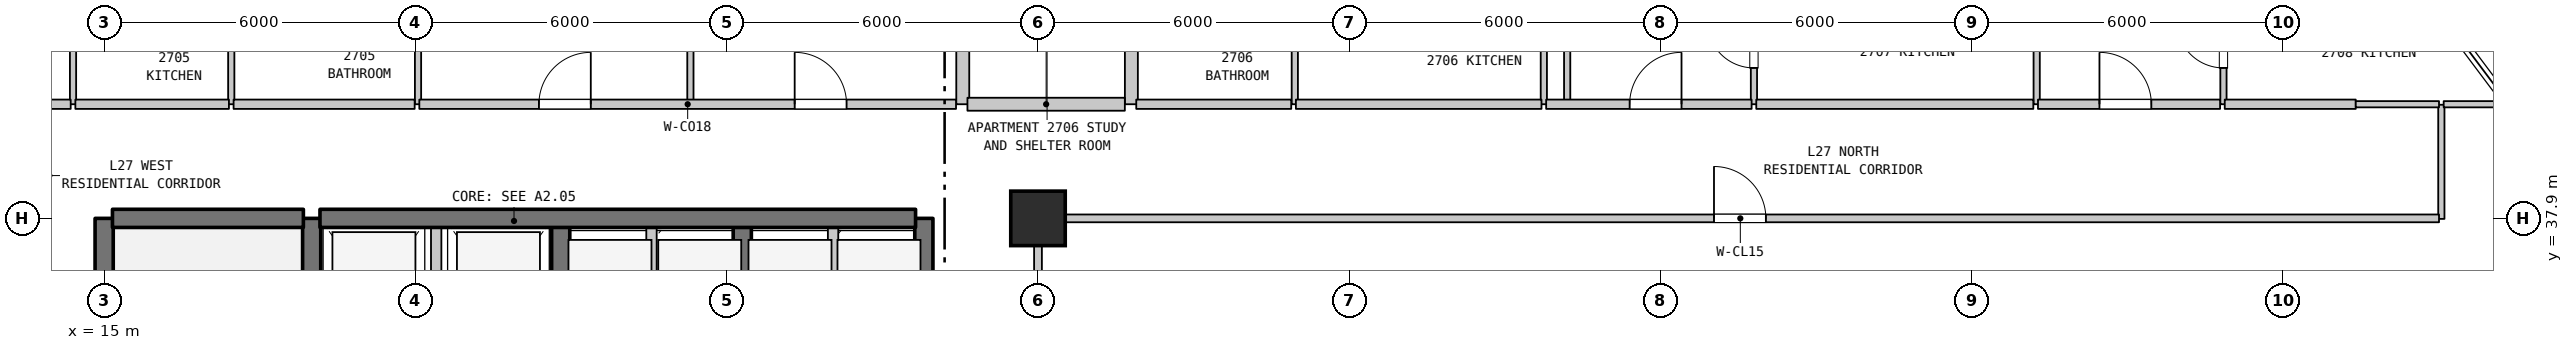
"""IFC4 building model, lengths in metres.
Left out: names, types, materials, properties, quantities, classifications, styles, units other than length and angle.
Written with IfcOpenShell. Run it as: python <this file> out.ifc"""

import sys

from ifc_helpers import new_model, si_unit, direction, frame, frame_2d, origin, origin_2d, place, context, subcontext, project, spatial, rectangle, extrude, element, fill, save


model = new_model("IFC4")
c1 = context("Model", 3, precision=1e-05, world=origin(), true_north=direction((0.0, 1.0)))
c2 = subcontext(c1, "Body", "Model", "MODEL_VIEW")
j1 = project(units=[si_unit("LENGTHUNIT", "METRE"), si_unit("PLANEANGLEUNIT", "RADIAN")], contexts=[c1])
p1 = place(None, origin())
s1 = spatial("IfcSite", under=j1, at=p1, CompositionType="ELEMENT")
p2 = place(p1, origin())
s2 = spatial("IfcBuilding", under=s1, at=p2, CompositionType="ELEMENT")
p3 = place(p2, frame((0.0, 0.0, 113.1)))
s3 = spatial("IfcBuildingStorey", under=s2, at=p3, CompositionType="ELEMENT", Elevation=113.1)
p4 = place(p3, frame((33.0, 37.9, 0.0), z_axis=(0.0, 0.0, 1.0), x_axis=(1.0, 0.0, 0.0)))
e1 = element("IfcColumn", 1, at=p4, inside=s3, PredefinedType="COLUMN", context=c2, shape_type="SweptSolid", body=[
    extrude(rectangle(XDim=1.05, YDim=1.05, at=origin_2d()), origin(), (0.0, 0.0, 1.0), 3.7),
])
p5 = place(p3, frame((14.4, 40.1, 0.0), z_axis=(0.0, 0.0, 1.0), x_axis=(0.0, 1.0, 0.0)))
e2 = element("IfcWall", 2, at=p5, inside=s3, PredefinedType="PARTITIONING", context=c2, shape_type="SweptSolid", body=[
    extrude(rectangle(XDim=2.3, YDim=0.12, at=frame_2d((1.15, 0.0))), origin(), (0.0, 0.0, 1.0), 3.385),
])
p6 = place(p3, frame((15.0, 31.1, 0.0), z_axis=(0.0, 0.0, 1.0), x_axis=(0.0, 1.0, 0.0)))
e3 = element("IfcWall", 3, at=p6, inside=s3, PredefinedType="SHEAR", context=c2, shape_type="SweptSolid", body=[
    extrude(rectangle(XDim=6.8, YDim=0.35, at=frame_2d((3.4, 0.0))), origin(), (0.0, 0.0, 1.0), 3.385),
])
p7 = place(p3, frame((17.45, 40.1, 0.0), z_axis=(0.0, 0.0, 1.0), x_axis=(0.0, 1.0, 0.0)))
e4 = element("IfcWall", 4, at=p7, inside=s3, PredefinedType="PARTITIONING", context=c2, shape_type="SweptSolid", body=[
    extrude(rectangle(XDim=2.3, YDim=0.12, at=frame_2d((1.15, 0.0))), origin(), (0.0, 0.0, 1.0), 3.385),
])
p8 = place(p3, frame((19.0, 35.0, 0.0), z_axis=(0.0, 0.0, 1.0), x_axis=(0.0, 1.0, 0.0)))
e5 = element("IfcWall", 5, at=p8, inside=s3, PredefinedType="SHEAR", context=c2, shape_type="SweptSolid", body=[
    extrude(rectangle(XDim=2.9, YDim=0.35, at=frame_2d((1.45, 0.0))), origin(), (0.0, 0.0, 1.0), 3.385),
])
p9 = place(p3, frame((21.05, 40.1, 0.0), z_axis=(0.0, 0.0, 1.0), x_axis=(0.0, 1.0, 0.0)))
e6 = element("IfcWall", 6, at=p9, inside=s3, PredefinedType="PARTITIONING", context=c2, shape_type="SweptSolid", body=[
    extrude(rectangle(XDim=2.3, YDim=0.12, at=frame_2d((1.15, 0.0))), origin(), (0.0, 0.0, 1.0), 3.085),
])
p10 = place(p3, frame((21.4, 35.0, 0.0), z_axis=(0.0, 0.0, 1.0), x_axis=(0.0, 1.0, 0.0)))
e7 = element("IfcWall", 7, at=p10, inside=s3, PredefinedType="STANDARD", context=c2, shape_type="SweptSolid", body=[
    extrude(rectangle(XDim=2.9, YDim=0.2, at=frame_2d((1.45, 0.0))), origin(), (0.0, 0.0, 1.0), 3.385),
])
p11 = place(p3, frame((23.8, 35.0, 0.0), z_axis=(0.0, 0.0, 1.0), x_axis=(0.0, 1.0, 0.0)))
e8 = element("IfcWall", 8, at=p11, inside=s3, PredefinedType="SHEAR", context=c2, shape_type="SweptSolid", body=[
    extrude(rectangle(XDim=2.9, YDim=0.35, at=frame_2d((1.45, 0.0))), origin(), (0.0, 0.0, 1.0), 3.385),
])
p12 = place(p3, frame((25.55, 35.0, 0.0), z_axis=(0.0, 0.0, 1.0), x_axis=(0.0, 1.0, 0.0)))
e9 = element("IfcWall", 9, at=p12, inside=s3, PredefinedType="STANDARD", context=c2, shape_type="SweptSolid", body=[
    extrude(rectangle(XDim=2.9, YDim=0.2, at=frame_2d((1.45, 0.0))), origin(), (0.0, 0.0, 1.0), 3.385),
])
p13 = place(p3, frame((26.3, 40.1, 0.0), z_axis=(0.0, 0.0, 1.0), x_axis=(0.0, 1.0, 0.0)))
e10 = element("IfcWall", 10, at=p13, inside=s3, PredefinedType="PARTITIONING", context=c2, shape_type="SweptSolid", body=[
    extrude(rectangle(XDim=2.05, YDim=0.12, at=frame_2d((1.025, 0.0))), origin(), (0.0, 0.0, 1.0), 3.385),
])
p14 = place(p3, frame((27.3, 35.0, 0.0), z_axis=(0.0, 0.0, 1.0), x_axis=(0.0, 1.0, 0.0)))
e11 = element("IfcWall", 11, at=p14, inside=s3, PredefinedType="SHEAR", context=c2, shape_type="SweptSolid", body=[
    extrude(rectangle(XDim=2.9, YDim=0.35, at=frame_2d((1.45, 0.0))), origin(), (0.0, 0.0, 1.0), 3.385),
])
p15 = place(p3, frame((29.05, 35.0, 0.0), z_axis=(0.0, 0.0, 1.0), x_axis=(0.0, 1.0, 0.0)))
e12 = element("IfcWall", 12, at=p15, inside=s3, PredefinedType="STANDARD", context=c2, shape_type="SweptSolid", body=[
    extrude(rectangle(XDim=2.9, YDim=0.2, at=frame_2d((1.45, 0.0))), origin(), (0.0, 0.0, 1.0), 3.385),
])
p16 = place(p3, frame((30.8, 35.0, 0.0), z_axis=(0.0, 0.0, 1.0), x_axis=(0.0, 1.0, 0.0)))
e13 = element("IfcWall", 13, at=p16, inside=s3, PredefinedType="SHEAR", context=c2, shape_type="SweptSolid", body=[
    extrude(rectangle(XDim=2.9, YDim=0.35, at=frame_2d((1.45, 0.0))), origin(), (0.0, 0.0, 1.0), 3.385),
])
p17 = place(p3, frame((31.55, 40.1, 0.0), z_axis=(0.0, 0.0, 1.0), x_axis=(0.0, 1.0, 0.0)))
e14 = element("IfcWall", 14, at=p17, inside=s3, PredefinedType="STANDARD", context=c2, shape_type="SweptSolid", body=[
    extrude(rectangle(XDim=2.3, YDim=0.25, at=frame_2d((1.15, 0.0))), origin(), (0.0, 0.0, 1.0), 3.385),
])
p18 = place(p3, frame((33.0, 27.91, 0.0), z_axis=(0.0, 0.0, 1.0), x_axis=(0.0, 1.0, 0.0)))
e15 = element("IfcWall", 15, at=p18, inside=s3, PredefinedType="STANDARD", context=c2, shape_type="SweptSolid", body=[
    extrude(rectangle(XDim=9.98, YDim=0.15, at=frame_2d((4.99, 0.0))), origin(), (0.0, 0.0, 1.0), 2.885),
])
p19 = place(p3, frame((34.8, 40.1, 0.0), z_axis=(0.0, 0.0, 1.0), x_axis=(0.0, 1.0, 0.0)))
e16 = element("IfcWall", 16, at=p19, inside=s3, PredefinedType="STANDARD", context=c2, shape_type="SweptSolid", body=[
    extrude(rectangle(XDim=2.3, YDim=0.25, at=frame_2d((1.15, 0.0))), origin(), (0.0, 0.0, 1.0), 3.385),
])
for number, where, z_axis, x_axis in (
    (17, (37.95, 40.1, 0.0), (0.0, 0.0, 1.0), (0.0, 1.0, 0.0)),
    (18, (42.75, 40.1, 0.0), (0.0, 0.0, 1.0), (0.0, 1.0, 0.0)),
):
    element("IfcWall", number, at=place(p3, frame(where, z_axis=z_axis, x_axis=x_axis)), inside=s3, PredefinedType="PARTITIONING", context=c2, shape_type="SweptSolid", body=[
        extrude(rectangle(XDim=2.3, YDim=0.12, at=frame_2d((1.15, 0.0))), origin(), (0.0, 0.0, 1.0), 3.385),
    ])
p20 = place(p3, frame((43.2, 40.1, 0.0), z_axis=(0.0, 0.0, 1.0), x_axis=(0.0, 1.0, 0.0)))
e19 = element("IfcWall", 19, at=p20, inside=s3, PredefinedType="PARTITIONING", context=c2, shape_type="SweptSolid", body=[
    extrude(rectangle(XDim=13.79, YDim=0.12, at=frame_2d((6.895, 0.0))), origin(), (0.0, 0.0, 1.0), 3.385),
])
p21 = place(p3, frame((46.8, 40.1, 0.0), z_axis=(0.0, 0.0, 1.0), x_axis=(0.0, 1.0, 0.0)))
e20 = element("IfcWall", 20, at=p21, inside=s3, PredefinedType="PARTITIONING", context=c2, shape_type="SweptSolid", body=[
    extrude(rectangle(XDim=2.3, YDim=0.12, at=frame_2d((1.15, 0.0))), origin(), (0.0, 0.0, 1.0), 3.385),
])
p22 = place(p21, frame((0.7, 0.0, 0.0)))
e21 = element("IfcOpeningElement", 21, at=p22, cuts=e20, PredefinedType="OPENING", context=c2, shape_type="SweptSolid", body=[
    extrude(rectangle(XDim=0.9, YDim=2.15, at=frame_2d((0.45, 1.075))), frame((0.0, 0.07, 0.0), z_axis=(0.0, -1.0, 0.0), x_axis=(1.0, 0.0, 0.0)), (0.0, 0.0, 1.0), 0.14),
])
p23 = place(p3, frame((52.25, 40.1, 0.0), z_axis=(0.0, 0.0, 1.0), x_axis=(0.0, 1.0, 0.0)))
e22 = element("IfcWall", 22, at=p23, inside=s3, PredefinedType="PARTITIONING", context=c2, shape_type="SweptSolid", body=[
    extrude(rectangle(XDim=2.3, YDim=0.12, at=frame_2d((1.15, 0.0))), origin(), (0.0, 0.0, 1.0), 3.385),
])
p24 = place(p3, frame((55.85, 40.1, 0.0), z_axis=(0.0, 0.0, 1.0), x_axis=(0.0, 1.0, 0.0)))
e23 = element("IfcWall", 23, at=p24, inside=s3, PredefinedType="PARTITIONING", context=c2, shape_type="SweptSolid", body=[
    extrude(rectangle(XDim=2.3, YDim=0.12, at=frame_2d((1.15, 0.0))), origin(), (0.0, 0.0, 1.0), 3.385),
])
p25 = place(p24, frame((0.7, 0.0, 0.0)))
e24 = element("IfcOpeningElement", 24, at=p25, cuts=e23, PredefinedType="OPENING", context=c2, shape_type="SweptSolid", body=[
    extrude(rectangle(XDim=0.9, YDim=2.15, at=frame_2d((0.45, 1.075))), frame((0.0, 0.07, 0.0), z_axis=(0.0, -1.0, 0.0), x_axis=(1.0, 0.0, 0.0)), (0.0, 0.0, 1.0), 0.14),
])
p26 = place(p3, frame((60.05, 37.89, 0.0), z_axis=(0.0, 0.0, 1.0), x_axis=(0.0, 1.0, 0.0)))
e25 = element("IfcWall", 25, at=p26, inside=s3, PredefinedType="PARTITIONING", context=c2, shape_type="SweptSolid", body=[
    extrude(rectangle(XDim=2.2, YDim=0.12, at=frame_2d((1.1, 0.0))), origin(), (0.0, 0.0, 1.0), 3.385),
])
p27 = place(p3, frame((15.16, 37.9, 0.0), z_axis=(0.0, 0.0, 1.0), x_axis=(1.0, 0.0, 0.0)))
e26 = element("IfcWall", 26, at=p27, inside=s3, PredefinedType="SHEAR", context=c2, shape_type="SweptSolid", body=[
    extrude(rectangle(XDim=3.68, YDim=0.35, at=frame_2d((1.84, 0.0))), origin(), (0.0, 0.0, 1.0), 3.385),
])
p28 = place(p3, frame((19.16, 37.9, 0.0), z_axis=(0.0, 0.0, 1.0), x_axis=(1.0, 0.0, 0.0)))
e27 = element("IfcWall", 27, at=p28, inside=s3, PredefinedType="SHEAR", context=c2, shape_type="SweptSolid", body=[
    extrude(rectangle(XDim=11.48, YDim=0.35, at=frame_2d((5.74, 0.0))), origin(), (0.0, 0.0, 1.0), 3.385),
])
p29 = place(p3, frame((33.07, 37.9, 0.0), z_axis=(0.0, 0.0, 1.0), x_axis=(1.0, 0.0, 0.0)))
e28 = element("IfcWall", 28, at=p29, inside=s3, PredefinedType="STANDARD", context=c2, shape_type="SweptSolid", body=[
    extrude(rectangle(XDim=26.935, YDim=0.15, at=frame_2d((13.467, 0.0))), origin(), (0.0, 0.0, 1.0), 3.385),
])
p30 = place(p29, frame((12.96, 0.0, 0.0)))
e29 = element("IfcOpeningElement", 29, at=p30, cuts=e28, PredefinedType="OPENING", context=c2, shape_type="SweptSolid", body=[
    extrude(rectangle(XDim=1.0, YDim=2.15, at=frame_2d((0.5, 1.075))), frame((0.0, 0.085, 0.0), z_axis=(0.0, -1.0, 0.0), x_axis=(1.0, 0.0, 0.0)), (0.0, 0.0, 1.0), 0.17),
])
p31 = place(p3, frame((12.875, 40.1, 0.0), z_axis=(0.0, 0.0, 1.0), x_axis=(1.0, 0.0, 0.0)))
e30 = element("IfcWall", 30, at=p31, inside=s3, PredefinedType="STANDARD", context=c2, shape_type="SweptSolid", body=[
    extrude(rectangle(XDim=1.48, YDim=0.18, at=frame_2d((0.74, 0.0))), origin(), (0.0, 0.0, 1.0), 3.385),
])
p32 = place(p3, frame((14.445, 40.1, 0.0), z_axis=(0.0, 0.0, 1.0), x_axis=(1.0, 0.0, 0.0)))
e31 = element("IfcWall", 31, at=p32, inside=s3, PredefinedType="STANDARD", context=c2, shape_type="SweptSolid", body=[
    extrude(rectangle(XDim=2.96, YDim=0.18, at=frame_2d((1.48, 0.0))), origin(), (0.0, 0.0, 1.0), 3.385),
])
p33 = place(p3, frame((17.495, 40.1, 0.0), z_axis=(0.0, 0.0, 1.0), x_axis=(1.0, 0.0, 0.0)))
e32 = element("IfcWall", 32, at=p33, inside=s3, PredefinedType="STANDARD", context=c2, shape_type="SweptSolid", body=[
    extrude(rectangle(XDim=3.49, YDim=0.18, at=frame_2d((1.745, 0.0))), origin(), (0.0, 0.0, 1.0), 3.385),
])
p34 = place(p3, frame((21.075, 40.1, 0.0), z_axis=(0.0, 0.0, 1.0), x_axis=(1.0, 0.0, 0.0)))
e33 = element("IfcWall", 33, at=p34, inside=s3, PredefinedType="STANDARD", context=c2, shape_type="SweptSolid", body=[
    extrude(rectangle(XDim=10.345, YDim=0.18, at=frame_2d((5.172, 0.0))), origin(), (0.0, 0.0, 1.0), 3.385),
])
p35 = place(p34, frame((2.305, 0.0, 0.0)))
e34 = element("IfcOpeningElement", 34, at=p35, cuts=e33, PredefinedType="OPENING", context=c2, shape_type="SweptSolid", body=[
    extrude(rectangle(XDim=1.0, YDim=2.15, at=frame_2d((0.5, 1.075))), frame((0.0, 0.1, 0.0), z_axis=(0.0, -1.0, 0.0), x_axis=(1.0, 0.0, 0.0)), (0.0, 0.0, 1.0), 0.2),
])
p36 = place(p34, frame((7.235, 0.0, 0.0)))
e35 = element("IfcOpeningElement", 35, at=p36, cuts=e33, PredefinedType="OPENING", context=c2, shape_type="SweptSolid", body=[
    extrude(rectangle(XDim=1.0, YDim=2.15, at=frame_2d((0.5, 1.075))), frame((0.0, 0.1, 0.0), z_axis=(0.0, -1.0, 0.0), x_axis=(1.0, 0.0, 0.0)), (0.0, 0.0, 1.0), 0.2),
])
p37 = place(p3, frame((31.64, 40.1, 0.0), z_axis=(0.0, 0.0, 1.0), x_axis=(1.0, 0.0, 0.0)))
e36 = element("IfcWall", 36, at=p37, inside=s3, PredefinedType="STANDARD", context=c2, shape_type="SweptSolid", body=[
    extrude(rectangle(XDim=3.034, YDim=0.25, at=frame_2d((1.517, 0.0))), origin(), (0.0, 0.0, 1.0), 3.385),
])
p38 = place(p3, frame((34.894, 40.1, 0.0), z_axis=(0.0, 0.0, 1.0), x_axis=(1.0, 0.0, 0.0)))
e37 = element("IfcWall", 37, at=p38, inside=s3, PredefinedType="STANDARD", context=c2, shape_type="SweptSolid", body=[
    extrude(rectangle(XDim=2.987, YDim=0.18, at=frame_2d((1.494, 0.0))), origin(), (0.0, 0.0, 1.0), 3.385),
])
p39 = place(p3, frame((37.971, 40.1, 0.0), z_axis=(0.0, 0.0, 1.0), x_axis=(1.0, 0.0, 0.0)))
e38 = element("IfcWall", 38, at=p39, inside=s3, PredefinedType="STANDARD", context=c2, shape_type="SweptSolid", body=[
    extrude(rectangle(XDim=4.734, YDim=0.18, at=frame_2d((2.367, 0.0))), origin(), (0.0, 0.0, 1.0), 3.385),
])
p40 = place(p3, frame((42.795, 40.1, 0.0), z_axis=(0.0, 0.0, 1.0), x_axis=(1.0, 0.0, 0.0)))
e39 = element("IfcWall", 39, at=p40, inside=s3, PredefinedType="STANDARD", context=c2, shape_type="SweptSolid", body=[
    extrude(rectangle(XDim=3.96, YDim=0.18, at=frame_2d((1.98, 0.0))), origin(), (0.0, 0.0, 1.0), 3.385),
])
p41 = place(p40, frame((1.609, 0.0, 0.0)))
e40 = element("IfcOpeningElement", 40, at=p41, cuts=e39, PredefinedType="OPENING", context=c2, shape_type="SweptSolid", body=[
    extrude(rectangle(XDim=1.0, YDim=2.15, at=frame_2d((0.5, 1.075))), frame((0.0, 0.1, 0.0), z_axis=(0.0, -1.0, 0.0), x_axis=(1.0, 0.0, 0.0)), (0.0, 0.0, 1.0), 0.2),
])
p42 = place(p3, frame((46.845, 40.1, 0.0), z_axis=(0.0, 0.0, 1.0), x_axis=(1.0, 0.0, 0.0)))
e41 = element("IfcWall", 41, at=p42, inside=s3, PredefinedType="STANDARD", context=c2, shape_type="SweptSolid", body=[
    extrude(rectangle(XDim=5.34, YDim=0.18, at=frame_2d((2.67, 0.0))), origin(), (0.0, 0.0, 1.0), 3.385),
])
p43 = place(p3, frame((52.275, 40.1, 0.0), z_axis=(0.0, 0.0, 1.0), x_axis=(1.0, 0.0, 0.0)))
e42 = element("IfcWall", 42, at=p43, inside=s3, PredefinedType="STANDARD", context=c2, shape_type="SweptSolid", body=[
    extrude(rectangle(XDim=3.51, YDim=0.18, at=frame_2d((1.755, 0.0))), origin(), (0.0, 0.0, 1.0), 3.385),
])
p44 = place(p43, frame((1.185, 0.0, 0.0)))
e43 = element("IfcOpeningElement", 43, at=p44, cuts=e42, PredefinedType="OPENING", context=c2, shape_type="SweptSolid", body=[
    extrude(rectangle(XDim=1.0, YDim=2.15, at=frame_2d((0.5, 1.075))), frame((0.0, 0.1, 0.0), z_axis=(0.0, -1.0, 0.0), x_axis=(1.0, 0.0, 0.0)), (0.0, 0.0, 1.0), 0.2),
])
p45 = place(p3, frame((55.875, 40.1, 0.0), z_axis=(0.0, 0.0, 1.0), x_axis=(1.0, 0.0, 0.0)))
e44 = element("IfcWall", 44, at=p45, inside=s3, PredefinedType="STANDARD", context=c2, shape_type="SweptSolid", body=[
    extrude(rectangle(XDim=2.525, YDim=0.18, at=frame_2d((1.262, 0.0))), origin(), (0.0, 0.0, 1.0), 3.385),
])
p46 = place(p3, frame((58.4, 40.1, 0.0), z_axis=(0.0, 0.0, 1.0), x_axis=(1.0, 0.0, 0.0)))
e45 = element("IfcWall", 45, at=p46, inside=s3, PredefinedType="PARTITIONING", context=c2, shape_type="SweptSolid", body=[
    extrude(rectangle(XDim=1.605, YDim=0.12, at=frame_2d((0.802, 0.0))), origin(), (0.0, 0.0, 1.0), 3.385),
])
p47 = place(p3, frame((60.095, 40.1, 0.0), z_axis=(0.0, 0.0, 1.0), x_axis=(1.0, 0.0, 0.0)))
e46 = element("IfcWall", 46, at=p47, inside=s3, PredefinedType="PARTITIONING", context=c2, shape_type="SweptSolid", body=[
    extrude(rectangle(XDim=1.245, YDim=0.12, at=frame_2d((0.623, 0.0))), origin(), (0.0, 0.0, 1.0), 3.385),
])
p48 = place(p22, origin())
e47 = element("IfcDoor", 47, at=p48, inside=s3, OperationType="SINGLE_SWING_RIGHT", PredefinedType="DOOR", context=c2, shape_type="SweptSolid", body=[
    extrude(rectangle(XDim=0.9, YDim=2.15, at=frame_2d((0.45, 1.075))), frame((0.0, 0.025, 0.0), z_axis=(0.0, -1.0, 0.0), x_axis=(1.0, 0.0, 0.0)), (0.0, 0.0, 1.0), 0.05),
])
fill(e21, e47)
p49 = place(p25, origin())
e48 = element("IfcDoor", 48, at=p49, inside=s3, OperationType="SINGLE_SWING_RIGHT", PredefinedType="DOOR", context=c2, shape_type="SweptSolid", body=[
    extrude(rectangle(XDim=0.9, YDim=2.15, at=frame_2d((0.45, 1.075))), frame((0.0, 0.025, 0.0), z_axis=(0.0, -1.0, 0.0), x_axis=(1.0, 0.0, 0.0)), (0.0, 0.0, 1.0), 0.05),
])
fill(e24, e48)
p50 = place(p30, origin())
e49 = element("IfcDoor", 49, at=p50, inside=s3, OperationType="SINGLE_SWING_LEFT", PredefinedType="DOOR", context=c2, shape_type="SweptSolid", body=[
    extrude(rectangle(XDim=1.0, YDim=2.15, at=frame_2d((0.5, 1.075))), frame((0.0, 0.025, 0.0), z_axis=(0.0, -1.0, 0.0), x_axis=(1.0, 0.0, 0.0)), (0.0, 0.0, 1.0), 0.05),
])
fill(e29, e49)
p51 = place(p35, origin())
e50 = element("IfcDoor", 50, at=p51, inside=s3, OperationType="SINGLE_SWING_RIGHT", PredefinedType="DOOR", context=c2, shape_type="SweptSolid", body=[
    extrude(rectangle(XDim=1.0, YDim=2.15, at=frame_2d((0.5, 1.075))), frame((0.0, 0.025, 0.0), z_axis=(0.0, -1.0, 0.0), x_axis=(1.0, 0.0, 0.0)), (0.0, 0.0, 1.0), 0.05),
])
fill(e34, e50)
p52 = place(p36, origin())
e51 = element("IfcDoor", 51, at=p52, inside=s3, OperationType="SINGLE_SWING_LEFT", PredefinedType="DOOR", context=c2, shape_type="SweptSolid", body=[
    extrude(rectangle(XDim=1.0, YDim=2.15, at=frame_2d((0.5, 1.075))), frame((0.0, 0.025, 0.0), z_axis=(0.0, -1.0, 0.0), x_axis=(1.0, 0.0, 0.0)), (0.0, 0.0, 1.0), 0.05),
])
fill(e35, e51)
p53 = place(p41, origin())
e52 = element("IfcDoor", 52, at=p53, inside=s3, OperationType="SINGLE_SWING_RIGHT", PredefinedType="DOOR", context=c2, shape_type="SweptSolid", body=[
    extrude(rectangle(XDim=1.0, YDim=2.15, at=frame_2d((0.5, 1.075))), frame((0.0, 0.025, 0.0), z_axis=(0.0, -1.0, 0.0), x_axis=(1.0, 0.0, 0.0)), (0.0, 0.0, 1.0), 0.05),
])
fill(e40, e52)
p54 = place(p44, origin())
e53 = element("IfcDoor", 53, at=p54, inside=s3, OperationType="SINGLE_SWING_LEFT", PredefinedType="DOOR", context=c2, shape_type="SweptSolid", body=[
    extrude(rectangle(XDim=1.0, YDim=2.15, at=frame_2d((0.5, 1.075))), frame((0.0, 0.025, 0.0), z_axis=(0.0, -1.0, 0.0), x_axis=(1.0, 0.0, 0.0)), (0.0, 0.0, 1.0), 0.05),
])
fill(e43, e53)
save(model, sys.argv[1])
